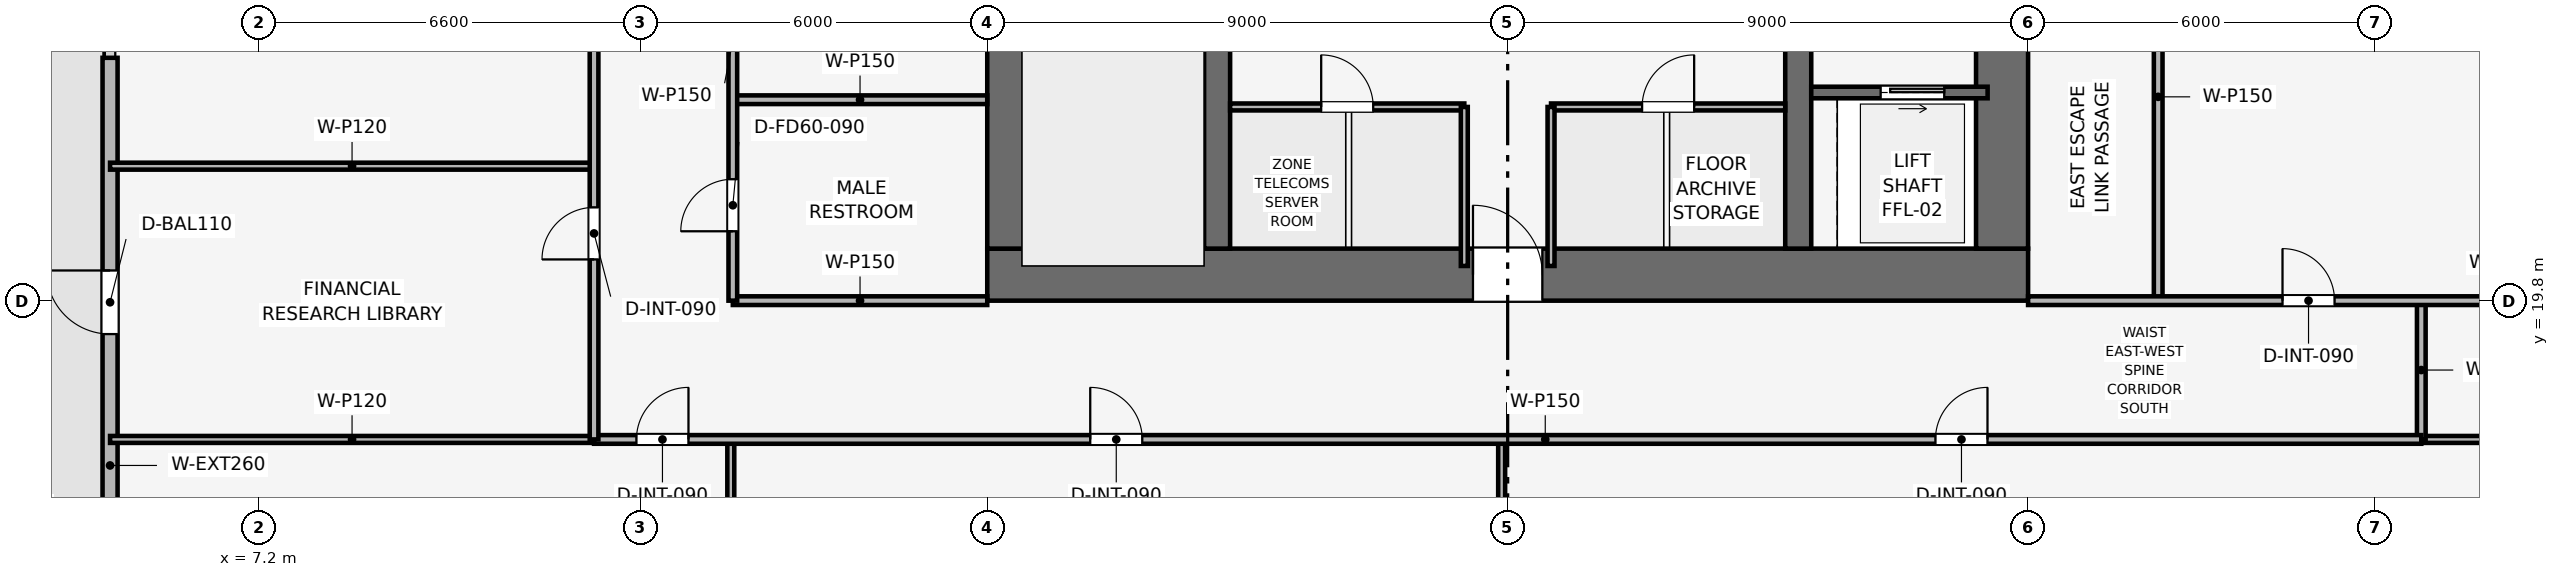
"""IFC4 building model, lengths in metres.
Left out: names, types, materials, properties, quantities, classifications, styles, units other than length and angle.
Written with IfcOpenShell. Run it as: python <this file> out.ifc"""

import sys

from ifc_helpers import new_model, si_unit, direction, frame, frame_2d, origin, place, context, subcontext, project, spatial, rectangle, extrude, element, fill, save


model = new_model("IFC4")
c1 = context("Model", 3, precision=1e-05, world=origin(), true_north=direction((0.0, 1.0)))
c2 = subcontext(c1, "Body", "Model", "MODEL_VIEW")
j1 = project(units=[si_unit("LENGTHUNIT", "METRE"), si_unit("PLANEANGLEUNIT", "RADIAN")], contexts=[c1])
p1 = place(None, origin())
s1 = spatial("IfcSite", under=j1, at=p1, CompositionType="ELEMENT")
p2 = place(p1, origin())
s2 = spatial("IfcBuilding", under=s1, at=p2, CompositionType="ELEMENT")
p3 = place(p2, frame((0.0, 0.0, 179.55)))
s3 = spatial("IfcBuildingStorey", under=s2, at=p3, CompositionType="ELEMENT", Elevation=179.55)
p4 = place(p3, frame((19.8, 20.25, 0.0), z_axis=(0.0, 0.0, 1.0), x_axis=(1.0, 0.0, 0.0)))
e1 = element("IfcWall", 1, at=p4, inside=s3, PredefinedType="SHEAR", context=c2, shape_type="SweptSolid", body=[
    extrude(rectangle(XDim=18.0, YDim=0.9, at=frame_2d((9.0, 0.0))), origin(), (0.0, 0.0, 1.0), 3.75),
])
p5 = place(p4, frame((8.4, 0.0, 0.0)))
e2 = element("IfcOpeningElement", 2, at=p5, cuts=e1, PredefinedType="OPENING", context=c2, shape_type="SweptSolid", body=[
    extrude(rectangle(XDim=1.2, YDim=2.2, at=frame_2d((0.6, 1.1))), frame((0.0, 0.46, 0.0), z_axis=(0.0, -1.0, 0.0), x_axis=(1.0, 0.0, 0.0)), (0.0, 0.0, 1.0), 0.92),
])
p6 = place(p3, frame((20.25, 20.7, 0.0), z_axis=(0.0, 0.0, 1.0), x_axis=(0.0, 1.0, 0.0)))
e3 = element("IfcWall", 3, at=p6, inside=s3, PredefinedType="SHEAR", context=c2, shape_type="SweptSolid", body=[
    extrude(rectangle(XDim=16.2, YDim=0.9, at=frame_2d((8.1, 0.0))), origin(), (0.0, 0.0, 1.0), 3.75),
])
p7 = place(p6, frame((10.1, 0.0, 0.0)))
e4 = element("IfcOpeningElement", 4, at=p7, cuts=e3, PredefinedType="OPENING", context=c2, shape_type="SweptSolid", body=[
    extrude(rectangle(XDim=1.1, YDim=2.15, at=frame_2d((0.55, 1.075))), frame((0.0, 0.46, 0.0), z_axis=(0.0, -1.0, 0.0), x_axis=(1.0, 0.0, 0.0)), (0.0, 0.0, 1.0), 0.92),
])
p8 = place(p3, frame((37.35, 20.7, 0.0), z_axis=(0.0, 0.0, 1.0), x_axis=(0.0, 1.0, 0.0)))
e5 = element("IfcWall", 5, at=p8, inside=s3, PredefinedType="SHEAR", context=c2, shape_type="SweptSolid", body=[
    extrude(rectangle(XDim=16.2, YDim=0.9, at=frame_2d((8.1, 0.0))), origin(), (0.0, 0.0, 1.0), 3.75),
])
p9 = place(p8, frame((4.6, 0.0, 0.0)))
e6 = element("IfcOpeningElement", 6, at=p9, cuts=e5, PredefinedType="OPENING", context=c2, shape_type="SweptSolid", body=[
    extrude(rectangle(XDim=1.1, YDim=2.15, at=frame_2d((0.55, 1.075))), frame((0.0, 0.46, 0.0), z_axis=(0.0, -1.0, 0.0), x_axis=(1.0, 0.0, 0.0)), (0.0, 0.0, 1.0), 0.92),
])
for number, where, z_axis, x_axis in (
    (7, (23.775, 20.7, 0.0), (0.0, 0.0, 1.0), (0.0, 1.0, 0.0)),
    (8, (33.825, 20.7, 0.0), (0.0, 0.0, 1.0), (0.0, 1.0, 0.0)),
):
    element("IfcWall", number, at=place(p3, frame(where, z_axis=z_axis, x_axis=x_axis)), inside=s3, PredefinedType="SHEAR", context=c2, shape_type="SweptSolid", body=[
        extrude(rectangle(XDim=16.2, YDim=0.45, at=frame_2d((8.1, 0.0))), origin(), (0.0, 0.0, 1.0), 3.75),
    ])
p10 = place(p3, frame((4.63, 11.4, 0.0), z_axis=(0.0, 0.0, 1.0), x_axis=(0.0, 1.0, 0.0)))
e9 = element("IfcWall", 9, at=p10, inside=s3, PredefinedType="SOLIDWALL", context=c2, shape_type="SweptSolid", body=[
    extrude(rectangle(XDim=12.6, YDim=0.26, at=frame_2d((6.3, 0.0))), origin(), (0.0, 0.0, 1.0), 3.495),
])
p11 = place(p10, frame((7.822, 0.0, 0.0)))
e10 = element("IfcOpeningElement", 10, at=p11, cuts=e9, PredefinedType="OPENING", context=c2, shape_type="SweptSolid", body=[
    extrude(rectangle(XDim=1.1, YDim=2.2, at=frame_2d((0.55, 1.1))), frame((0.0, 0.14, 0.0), z_axis=(0.0, -1.0, 0.0), x_axis=(1.0, 0.0, 0.0)), (0.0, 0.0, 1.0), 0.28),
])
p12 = place(p3, frame((34.05, 23.4, 0.0), z_axis=(0.0, 0.0, 1.0), x_axis=(1.0, 0.0, 0.0)))
e11 = element("IfcWall", 11, at=p12, inside=s3, PredefinedType="SHEAR", context=c2, shape_type="SweptSolid", body=[
    extrude(rectangle(XDim=3.05, YDim=0.2, at=frame_2d((1.525, 0.0))), origin(), (0.0, 0.0, 1.0), 3.495),
])
p13 = place(p12, frame((1.2, 0.0, 0.0)))
e12 = element("IfcOpeningElement", 12, at=p13, cuts=e11, PredefinedType="OPENING", context=c2, shape_type="SweptSolid", body=[
    extrude(rectangle(XDim=1.1, YDim=2.15, at=frame_2d((0.55, 1.075))), frame((0.0, 0.11, 0.0), z_axis=(0.0, -1.0, 0.0), x_axis=(1.0, 0.0, 0.0)), (0.0, 0.0, 1.0), 0.22),
])
p14 = place(p3, frame((24.0, 23.15, 0.0), z_axis=(0.0, 0.0, 1.0), x_axis=(1.0, 0.0, 0.0)))
e13 = element("IfcWall", 13, at=p14, inside=s3, PredefinedType="PARTITIONING", context=c2, shape_type="SweptSolid", body=[
    extrude(rectangle(XDim=4.05, YDim=0.12, at=frame_2d((2.025, 0.0))), origin(), (0.0, 0.0, 1.0), 3.495),
])
p15 = place(p14, frame((1.575, 0.0, 0.0)))
e14 = element("IfcOpeningElement", 14, at=p15, cuts=e13, PredefinedType="OPENING", context=c2, shape_type="SweptSolid", body=[
    extrude(rectangle(XDim=0.9, YDim=2.1, at=frame_2d((0.45, 1.05))), frame((0.0, 0.07, 0.0), z_axis=(0.0, -1.0, 0.0), x_axis=(1.0, 0.0, 0.0)), (0.0, 0.0, 1.0), 0.14),
])
p16 = place(p3, frame((28.05, 20.4, 0.0), z_axis=(0.0, 0.0, 1.0), x_axis=(0.0, 1.0, 0.0)))
e15 = element("IfcWall", 15, at=p16, inside=s3, PredefinedType="PARTITIONING", context=c2, shape_type="SweptSolid", body=[
    extrude(rectangle(XDim=2.75, YDim=0.12, at=frame_2d((1.375, 0.0))), origin(), (0.0, 0.0, 1.0), 3.495),
])
p17 = place(p3, frame((29.55, 23.15, 0.0), z_axis=(0.0, 0.0, 1.0), x_axis=(1.0, 0.0, 0.0)))
e16 = element("IfcWall", 16, at=p17, inside=s3, PredefinedType="PARTITIONING", context=c2, shape_type="SweptSolid", body=[
    extrude(rectangle(XDim=4.05, YDim=0.12, at=frame_2d((2.025, 0.0))), origin(), (0.0, 0.0, 1.0), 3.495),
])
p18 = place(p17, frame((1.575, 0.0, 0.0)))
e17 = element("IfcOpeningElement", 17, at=p18, cuts=e16, PredefinedType="OPENING", context=c2, shape_type="SweptSolid", body=[
    extrude(rectangle(XDim=0.9, YDim=2.1, at=frame_2d((0.45, 1.05))), frame((0.0, 0.07, 0.0), z_axis=(0.0, -1.0, 0.0), x_axis=(1.0, 0.0, 0.0)), (0.0, 0.0, 1.0), 0.14),
])
p19 = place(p3, frame((29.55, 20.4, 0.0), z_axis=(0.0, 0.0, 1.0), x_axis=(0.0, 1.0, 0.0)))
e18 = element("IfcWall", 18, at=p19, inside=s3, PredefinedType="PARTITIONING", context=c2, shape_type="SweptSolid", body=[
    extrude(rectangle(XDim=2.75, YDim=0.12, at=frame_2d((1.375, 0.0))), origin(), (0.0, 0.0, 1.0), 3.495),
])
p20 = place(p3, frame((15.4, 19.8, 0.0), z_axis=(0.0, 0.0, 1.0), x_axis=(1.0, 0.0, 0.0)))
e19 = element("IfcWall", 19, at=p20, inside=s3, PredefinedType="PARTITIONING", context=c2, shape_type="SweptSolid", body=[
    extrude(rectangle(XDim=4.4, YDim=0.15, at=frame_2d((2.2, 0.0))), origin(), (0.0, 0.0, 1.0), 3.03),
])
p21 = place(p3, frame((15.4, 23.275, 0.0), z_axis=(0.0, 0.0, 1.0), x_axis=(1.0, 0.0, 0.0)))
e20 = element("IfcWall", 20, at=p21, inside=s3, PredefinedType="PARTITIONING", context=c2, shape_type="SweptSolid", body=[
    extrude(rectangle(XDim=4.4, YDim=0.15, at=frame_2d((2.2, 0.0))), origin(), (0.0, 0.0, 1.0), 3.495),
])
p22 = place(p3, frame((15.4, 19.8, 0.0), z_axis=(0.0, 0.0, 1.0), x_axis=(0.0, 1.0, 0.0)))
e21 = element("IfcWall", 21, at=p22, inside=s3, PredefinedType="PARTITIONING", context=c2, shape_type="SweptSolid", body=[
    extrude(rectangle(XDim=10.35, YDim=0.15, at=frame_2d((5.175, 0.0))), origin(), (0.0, 0.0, 1.0), 3.03),
])
p23 = place(p22, frame((1.2, 0.0, 0.0)))
e22 = element("IfcOpeningElement", 22, at=p23, cuts=e21, PredefinedType="OPENING", context=c2, shape_type="SweptSolid", body=[
    extrude(rectangle(XDim=0.9, YDim=2.1, at=frame_2d((0.45, 1.05))), frame((0.0, 0.085, 0.0), z_axis=(0.0, -1.0, 0.0), x_axis=(1.0, 0.0, 0.0)), (0.0, 0.0, 1.0), 0.17),
])
p24 = place(p22, frame((4.7, 0.0, 0.0)))
e23 = element("IfcOpeningElement", 23, at=p24, cuts=e21, PredefinedType="OPENING", context=c2, shape_type="SweptSolid", body=[
    extrude(rectangle(XDim=0.9, YDim=2.1, at=frame_2d((0.45, 1.05))), frame((0.0, 0.085, 0.0), z_axis=(0.0, -1.0, 0.0), x_axis=(1.0, 0.0, 0.0)), (0.0, 0.0, 1.0), 0.17),
])
p25 = place(p22, frame((8.1, 0.0, 0.0)))
e24 = element("IfcOpeningElement", 24, at=p25, cuts=e21, PredefinedType="OPENING", context=c2, shape_type="SweptSolid", body=[
    extrude(rectangle(XDim=0.95, YDim=2.1, at=frame_2d((0.475, 1.05))), frame((0.0, 0.085, 0.0), z_axis=(0.0, -1.0, 0.0), x_axis=(1.0, 0.0, 0.0)), (0.0, 0.0, 1.0), 0.17),
])
p26 = place(p3, frame((40.05, 19.8, 0.0), z_axis=(0.0, 0.0, 1.0), x_axis=(0.0, 1.0, 0.0)))
e25 = element("IfcWall", 25, at=p26, inside=s3, PredefinedType="PARTITIONING", context=c2, shape_type="SweptSolid", body=[
    extrude(rectangle(XDim=7.05, YDim=0.15, at=frame_2d((3.525, 0.0))), origin(), (0.0, 0.0, 1.0), 3.03),
])
for number, where, z_axis, x_axis in (
    (26, (15.365, 4.63, 0.0), (0.0, 0.0, 1.0), (0.0, 1.0, 0.0)),
    (27, (28.696, 4.63, 0.0), (0.0, 0.0, 1.0), (0.0, 1.0, 0.0)),
):
    element("IfcWall", number, at=place(p3, frame(where, z_axis=z_axis, x_axis=x_axis)), inside=s3, PredefinedType="PARTITIONING", context=c2, shape_type="SweptSolid", body=[
        extrude(rectangle(XDim=12.77, YDim=0.12, at=frame_2d((6.385, 0.0))), origin(), (0.0, 0.0, 1.0), 2.98),
    ])
for number, where, z_axis, x_axis in (
    (28, (4.63, 22.126, 0.0), (0.0, 0.0, 1.0), (1.0, 0.0, 0.0)),
    (29, (4.63, 17.4, 0.0), (0.0, 0.0, 1.0), (1.0, 0.0, 0.0)),
):
    element("IfcWall", number, at=place(p3, frame(where, z_axis=z_axis, x_axis=x_axis)), inside=s3, PredefinedType="PARTITIONING", context=c2, shape_type="SweptSolid", body=[
        extrude(rectangle(XDim=8.37, YDim=0.12, at=frame_2d((4.185, 0.0))), origin(), (0.0, 0.0, 1.0), 2.98),
    ])
p27 = place(p3, frame((44.6, 17.4, 0.0), z_axis=(0.0, 0.0, 1.0), x_axis=(1.0, 0.0, 0.0)))
e30 = element("IfcWall", 30, at=p27, inside=s3, PredefinedType="PARTITIONING", context=c2, shape_type="SweptSolid", body=[
    extrude(rectangle(XDim=8.37, YDim=0.12, at=frame_2d((4.185, 0.0))), origin(), (0.0, 0.0, 1.0), 2.98),
])
p28 = place(p3, frame((44.6, 17.4, 0.0), z_axis=(0.0, 0.0, 1.0), x_axis=(0.0, 1.0, 0.0)))
e31 = element("IfcWall", 31, at=p28, inside=s3, PredefinedType="PARTITIONING", context=c2, shape_type="SweptSolid", body=[
    extrude(rectangle(XDim=2.4, YDim=0.15, at=frame_2d((1.2, 0.0))), origin(), (0.0, 0.0, 1.0), 3.495),
])
p29 = place(p3, frame((37.8, 19.8, 0.0), z_axis=(0.0, 0.0, 1.0), x_axis=(1.0, 0.0, 0.0)))
e32 = element("IfcWall", 32, at=p29, inside=s3, PredefinedType="PARTITIONING", context=c2, shape_type="SweptSolid", body=[
    extrude(rectangle(XDim=15.17, YDim=0.15, at=frame_2d((7.585, 0.0))), origin(), (0.0, 0.0, 1.0), 2.98),
])
p30 = place(p29, frame((4.4, 0.0, 0.0)))
e33 = element("IfcOpeningElement", 33, at=p30, cuts=e32, PredefinedType="OPENING", context=c2, shape_type="SweptSolid", body=[
    extrude(rectangle(XDim=0.9, YDim=2.1, at=frame_2d((0.45, 1.05))), frame((0.0, 0.085, 0.0), z_axis=(0.0, -1.0, 0.0), x_axis=(1.0, 0.0, 0.0)), (0.0, 0.0, 1.0), 0.17),
])
p31 = place(p3, frame((13.0, 17.4, 0.0), z_axis=(0.0, 0.0, 1.0), x_axis=(1.0, 0.0, 0.0)))
e34 = element("IfcWall", 34, at=p31, inside=s3, PredefinedType="PARTITIONING", context=c2, shape_type="SweptSolid", body=[
    extrude(rectangle(XDim=31.6, YDim=0.15, at=frame_2d((15.8, 0.0))), origin(), (0.0, 0.0, 1.0), 3.03),
])
p32 = place(p31, frame((0.733, 0.0, 0.0)))
e35 = element("IfcOpeningElement", 35, at=p32, cuts=e34, PredefinedType="OPENING", context=c2, shape_type="SweptSolid", body=[
    extrude(rectangle(XDim=0.9, YDim=2.1, at=frame_2d((0.45, 1.05))), frame((0.0, 0.085, 0.0), z_axis=(0.0, -1.0, 0.0), x_axis=(1.0, 0.0, 0.0)), (0.0, 0.0, 1.0), 0.17),
])
p33 = place(p31, frame((8.581, 0.0, 0.0)))
e36 = element("IfcOpeningElement", 36, at=p33, cuts=e34, PredefinedType="OPENING", context=c2, shape_type="SweptSolid", body=[
    extrude(rectangle(XDim=0.9, YDim=2.1, at=frame_2d((0.45, 1.05))), frame((0.0, 0.085, 0.0), z_axis=(0.0, -1.0, 0.0), x_axis=(1.0, 0.0, 0.0)), (0.0, 0.0, 1.0), 0.17),
])
p34 = place(p31, frame((23.198, 0.0, 0.0)))
e37 = element("IfcOpeningElement", 37, at=p34, cuts=e34, PredefinedType="OPENING", context=c2, shape_type="SweptSolid", body=[
    extrude(rectangle(XDim=0.9, YDim=2.1, at=frame_2d((0.45, 1.05))), frame((0.0, 0.085, 0.0), z_axis=(0.0, -1.0, 0.0), x_axis=(1.0, 0.0, 0.0)), (0.0, 0.0, 1.0), 0.17),
])
p35 = place(p3, frame((13.0, 17.4, 0.0), z_axis=(0.0, 0.0, 1.0), x_axis=(0.0, 1.0, 0.0)))
e38 = element("IfcWall", 38, at=p35, inside=s3, PredefinedType="PARTITIONING", context=c2, shape_type="SweptSolid", body=[
    extrude(rectangle(XDim=22.8, YDim=0.15, at=frame_2d((11.4, 0.0))), origin(), (0.0, 0.0, 1.0), 3.03),
])
p36 = place(p35, frame((3.113, 0.0, 0.0)))
e39 = element("IfcOpeningElement", 39, at=p36, cuts=e38, PredefinedType="OPENING", context=c2, shape_type="SweptSolid", body=[
    extrude(rectangle(XDim=0.9, YDim=2.1, at=frame_2d((0.45, 1.05))), frame((0.0, 0.085, 0.0), z_axis=(0.0, -1.0, 0.0), x_axis=(1.0, 0.0, 0.0)), (0.0, 0.0, 1.0), 0.17),
])
p37 = place(p35, frame((7.542, 0.0, 0.0)))
e40 = element("IfcOpeningElement", 40, at=p37, cuts=e38, PredefinedType="OPENING", context=c2, shape_type="SweptSolid", body=[
    extrude(rectangle(XDim=0.9, YDim=2.1, at=frame_2d((0.45, 1.05))), frame((0.0, 0.085, 0.0), z_axis=(0.0, -1.0, 0.0), x_axis=(1.0, 0.0, 0.0)), (0.0, 0.0, 1.0), 0.17),
])
p38 = place(p35, frame((15.378, 0.0, 0.0)))
e41 = element("IfcOpeningElement", 41, at=p38, cuts=e38, PredefinedType="OPENING", context=c2, shape_type="SweptSolid", body=[
    extrude(rectangle(XDim=0.9, YDim=2.1, at=frame_2d((0.45, 1.05))), frame((0.0, 0.085, 0.0), z_axis=(0.0, -1.0, 0.0), x_axis=(1.0, 0.0, 0.0)), (0.0, 0.0, 1.0), 0.17),
])
p39 = place(p11, origin())
e42 = element("IfcDoor", 42, at=p39, inside=s3, OperationType="SINGLE_SWING_RIGHT", PredefinedType="DOOR", context=c2, shape_type="SweptSolid", body=[
    extrude(rectangle(XDim=1.1, YDim=2.2, at=frame_2d((0.55, 1.1))), frame((0.0, 0.025, 0.0), z_axis=(0.0, -1.0, 0.0), x_axis=(1.0, 0.0, 0.0)), (0.0, 0.0, 1.0), 0.05),
])
fill(e10, e42)
p40 = place(p13, origin())
e43 = element("IfcDoor", 43, at=p40, inside=s3, OperationType="SLIDING_TO_RIGHT", PredefinedType="DOOR", context=c2, shape_type="SweptSolid", body=[
    extrude(rectangle(XDim=1.1, YDim=2.15, at=frame_2d((0.55, 1.075))), frame((0.0, 0.025, 0.0), z_axis=(0.0, -1.0, 0.0), x_axis=(1.0, 0.0, 0.0)), (0.0, 0.0, 1.0), 0.05),
])
fill(e12, e43)
p41 = place(p15, origin())
e44 = element("IfcDoor", 44, at=p41, inside=s3, OperationType="SINGLE_SWING_LEFT", PredefinedType="DOOR", context=c2, shape_type="SweptSolid", body=[
    extrude(rectangle(XDim=0.9, YDim=2.1, at=frame_2d((0.45, 1.05))), frame((0.0, 0.025, 0.0), z_axis=(0.0, -1.0, 0.0), x_axis=(1.0, 0.0, 0.0)), (0.0, 0.0, 1.0), 0.05),
])
fill(e14, e44)
p42 = place(p18, origin())
e45 = element("IfcDoor", 45, at=p42, inside=s3, OperationType="SINGLE_SWING_RIGHT", PredefinedType="DOOR", context=c2, shape_type="SweptSolid", body=[
    extrude(rectangle(XDim=0.9, YDim=2.1, at=frame_2d((0.45, 1.05))), frame((0.0, 0.025, 0.0), z_axis=(0.0, -1.0, 0.0), x_axis=(1.0, 0.0, 0.0)), (0.0, 0.0, 1.0), 0.05),
])
fill(e17, e45)
p43 = place(p23, origin())
e46 = element("IfcDoor", 46, at=p43, inside=s3, OperationType="SINGLE_SWING_LEFT", PredefinedType="DOOR", context=c2, shape_type="SweptSolid", body=[
    extrude(rectangle(XDim=0.9, YDim=2.1, at=frame_2d((0.45, 1.05))), frame((0.0, 0.025, 0.0), z_axis=(0.0, -1.0, 0.0), x_axis=(1.0, 0.0, 0.0)), (0.0, 0.0, 1.0), 0.05),
])
fill(e22, e46)
p44 = place(p30, origin())
e47 = element("IfcDoor", 47, at=p44, inside=s3, OperationType="SINGLE_SWING_LEFT", PredefinedType="DOOR", context=c2, shape_type="SweptSolid", body=[
    extrude(rectangle(XDim=0.9, YDim=2.1, at=frame_2d((0.45, 1.05))), frame((0.0, 0.025, 0.0), z_axis=(0.0, -1.0, 0.0), x_axis=(1.0, 0.0, 0.0)), (0.0, 0.0, 1.0), 0.05),
])
fill(e33, e47)
p45 = place(p32, origin())
e48 = element("IfcDoor", 48, at=p45, inside=s3, OperationType="SINGLE_SWING_RIGHT", PredefinedType="DOOR", context=c2, shape_type="SweptSolid", body=[
    extrude(rectangle(XDim=0.9, YDim=2.1, at=frame_2d((0.45, 1.05))), frame((0.0, 0.025, 0.0), z_axis=(0.0, -1.0, 0.0), x_axis=(1.0, 0.0, 0.0)), (0.0, 0.0, 1.0), 0.05),
])
fill(e35, e48)
p46 = place(p33, origin())
e49 = element("IfcDoor", 49, at=p46, inside=s3, OperationType="SINGLE_SWING_LEFT", PredefinedType="DOOR", context=c2, shape_type="SweptSolid", body=[
    extrude(rectangle(XDim=0.9, YDim=2.1, at=frame_2d((0.45, 1.05))), frame((0.0, 0.025, 0.0), z_axis=(0.0, -1.0, 0.0), x_axis=(1.0, 0.0, 0.0)), (0.0, 0.0, 1.0), 0.05),
])
fill(e36, e49)
p47 = place(p34, origin())
e50 = element("IfcDoor", 50, at=p47, inside=s3, OperationType="SINGLE_SWING_RIGHT", PredefinedType="DOOR", context=c2, shape_type="SweptSolid", body=[
    extrude(rectangle(XDim=0.9, YDim=2.1, at=frame_2d((0.45, 1.05))), frame((0.0, 0.025, 0.0), z_axis=(0.0, -1.0, 0.0), x_axis=(1.0, 0.0, 0.0)), (0.0, 0.0, 1.0), 0.05),
])
fill(e37, e50)
p48 = place(p36, origin())
e51 = element("IfcDoor", 51, at=p48, inside=s3, OperationType="SINGLE_SWING_LEFT", PredefinedType="DOOR", context=c2, shape_type="SweptSolid", body=[
    extrude(rectangle(XDim=0.9, YDim=2.1, at=frame_2d((0.45, 1.05))), frame((0.0, 0.025, 0.0), z_axis=(0.0, -1.0, 0.0), x_axis=(1.0, 0.0, 0.0)), (0.0, 0.0, 1.0), 0.05),
])
fill(e39, e51)
p49 = place(p5, origin())
e52 = element("IfcDoor", 52, at=p49, inside=s3, OperationType="SINGLE_SWING_LEFT", PredefinedType="DOOR", context=c2, shape_type="SweptSolid", body=[
    extrude(rectangle(XDim=1.2, YDim=2.2, at=frame_2d((0.6, 1.1))), frame((0.0, 0.025, 0.0), z_axis=(0.0, -1.0, 0.0), x_axis=(1.0, 0.0, 0.0)), (0.0, 0.0, 1.0), 0.05),
])
fill(e2, e52)
save(model, sys.argv[1])
